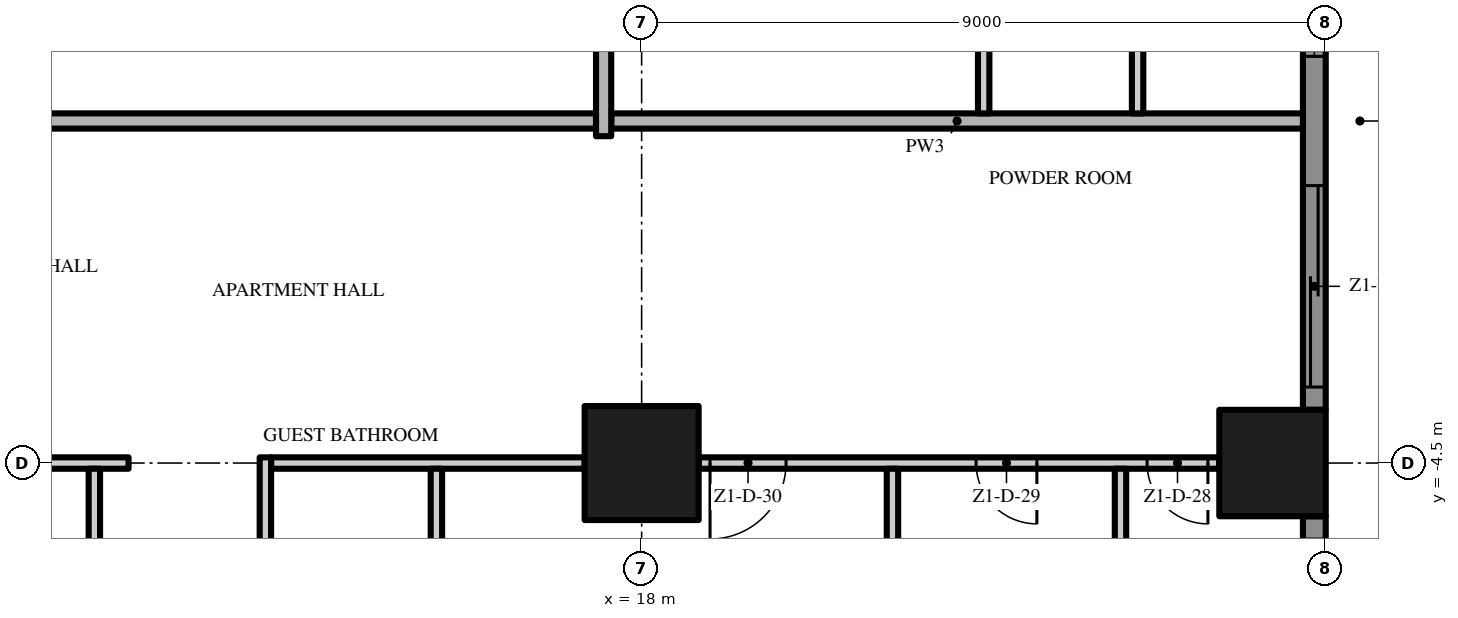
"""IFC4 building model, lengths in metres.
Left out: names, types, materials, properties, quantities, classifications, styles, units other than length and angle.
Written with IfcOpenShell. Run it as: python <this file> out.ifc"""

import sys

from ifc_helpers import new_model, si_unit, direction, frame, frame_2d, origin, origin_2d, place, context, subcontext, project, spatial, polyline, rectangle, outline, extrude, element, fill, save


model = new_model("IFC4")
c1 = context("Model", 3, precision=1e-05, world=origin(), true_north=direction((0.0, 1.0)))
c2 = subcontext(c1, "Body", "Model", "MODEL_VIEW")
j1 = project(units=[si_unit("LENGTHUNIT", "METRE"), si_unit("PLANEANGLEUNIT", "RADIAN")], contexts=[c1])
p1 = place(None, origin())
s1 = spatial("IfcSite", under=j1, at=p1, CompositionType="ELEMENT")
p2 = place(p1, origin())
s2 = spatial("IfcBuilding", under=s1, at=p2, CompositionType="ELEMENT")
p3 = place(p2, frame((0.0, 0.0, 49.2)))
s3 = spatial("IfcBuildingStorey", under=s2, at=p3, CompositionType="ELEMENT", Elevation=49.2)
p4 = place(p3, frame((18.0, -4.5, 0.0), z_axis=(0.0, 0.0, 1.0), x_axis=(1.0, 0.0, 0.0)))
e1 = element("IfcColumn", 1, at=p4, inside=s3, PredefinedType="COLUMN", context=c2, shape_type="SweptSolid", body=[
    extrude(rectangle(XDim=1.5, YDim=1.5, at=origin_2d()), origin(), (0.0, 0.0, 1.0), 3.5),
])
p5 = place(p3, frame((26.3, -4.5, 0.0), z_axis=(0.0, 0.0, 1.0), x_axis=(1.0, 0.0, 0.0)))
e2 = element("IfcColumn", 2, at=p5, inside=s3, PredefinedType="COLUMN", context=c2, shape_type="SweptSolid", body=[
    extrude(rectangle(XDim=1.4, YDim=1.4, at=origin_2d()), origin(), (0.0, 0.0, 1.0), 3.5),
])
p6 = place(p3, frame((26.85, -5.2, 0.0), z_axis=(0.0, 0.0, 1.0), x_axis=(0.0, -1.0, 0.0)))
e3 = element("IfcWall", 3, at=p6, inside=s3, PredefinedType="SOLIDWALL", context=c2, shape_type="SweptSolid", body=[
    extrude(rectangle(XDim=7.6, YDim=0.3, at=frame_2d((3.8, 0.0))), origin(), (0.0, 0.0, 1.0), 3.5),
])
p7 = place(p6, frame((4.65, 0.0, 0.45)))
e4 = element("IfcOpeningElement", 4, at=p7, cuts=e3, PredefinedType="OPENING", context=c2, shape_type="SweptSolid", body=[
    extrude(rectangle(XDim=2.65, YDim=2.65, at=frame_2d((1.325, 1.325))), frame((0.0, 0.16, 0.0), z_axis=(0.0, -1.0, 0.0), x_axis=(1.0, 0.0, 0.0)), (0.0, 0.0, 1.0), 0.32),
])
p8 = place(p6, frame((0.3, 0.0, 0.45)))
e5 = element("IfcOpeningElement", 5, at=p8, cuts=e3, PredefinedType="OPENING", context=c2, shape_type="SweptSolid", body=[
    extrude(rectangle(XDim=2.65, YDim=2.65, at=frame_2d((1.325, 1.325))), frame((0.0, 0.16, 0.0), z_axis=(0.0, -1.0, 0.0), x_axis=(1.0, 0.0, 0.0)), (0.0, 0.0, 1.0), 0.32),
])
p9 = place(p3, frame((26.85, 3.8, 0.0), z_axis=(0.0, 0.0, 1.0), x_axis=(0.0, -1.0, 0.0)))
e6 = element("IfcWall", 6, at=p9, inside=s3, PredefinedType="SOLIDWALL", context=c2, shape_type="SweptSolid", body=[
    extrude(rectangle(XDim=7.6, YDim=0.3, at=frame_2d((3.8, 0.0))), origin(), (0.0, 0.0, 1.0), 3.5),
])
p10 = place(p9, frame((4.65, 0.0, 0.0)))
e7 = element("IfcOpeningElement", 7, at=p10, cuts=e6, PredefinedType="OPENING", context=c2, shape_type="SweptSolid", body=[
    extrude(rectangle(XDim=2.65, YDim=2.4, at=frame_2d((1.325, 1.2))), frame((0.0, 0.16, 0.0), z_axis=(0.0, -1.0, 0.0), x_axis=(1.0, 0.0, 0.0)), (0.0, 0.0, 1.0), 0.32),
])
p11 = place(p9, frame((0.3, 0.0, 0.45)))
e8 = element("IfcOpeningElement", 8, at=p11, cuts=e6, PredefinedType="OPENING", context=c2, shape_type="SweptSolid", body=[
    extrude(rectangle(XDim=2.65, YDim=2.65, at=frame_2d((1.325, 1.325))), frame((0.0, 0.16, 0.0), z_axis=(0.0, -1.0, 0.0), x_axis=(1.0, 0.0, 0.0)), (0.0, 0.0, 1.0), 0.32),
])
p12 = place(p3, origin())
e9 = element("IfcWall", 9, at=p12, inside=s3, PredefinedType="USERDEFINED", context=c2, shape_type="SweptSolid", body=[
    extrude(outline(polyline([(29.649, -18.0), (29.985, -16.5), (30.0, -16.125), (29.869, -15.0), (29.345, -13.5), (28.612, -12.0), (27.951, -10.5), (27.615, -9.0), (27.6, -8.625), (27.731, -7.5), (28.255, -6.0), (28.988, -4.5), (29.649, -3.0), (29.985, -1.5), (30.0, -1.125), (29.869, 0.0), (29.345, 1.5), (28.612, 3.0), (27.951, 4.5), (27.615, 6.0), (27.6, 6.375), (27.731, 7.5), (28.255, 9.0), (28.988, 10.5), (29.649, 12.0), (29.985, 13.5), (30.0, 13.875), (29.869, 15.0), (29.345, 16.5), (28.612, 18.0), (28.388, 17.89), (29.114, 16.404), (29.624, 14.944), (29.749, 13.865), (29.736, 13.533), (29.41, 12.079), (28.761, 10.605), (28.024, 9.096), (27.486, 7.556), (27.349, 6.385), (27.366, 5.967), (27.713, 4.421), (28.385, 2.895), (29.114, 1.404), (29.624, -0.056), (29.749, -1.135), (29.736, -1.467), (29.41, -2.921), (28.761, -4.395), (28.024, -5.904), (27.486, -7.444), (27.349, -8.615), (27.366, -9.033), (27.713, -10.579), (28.385, -12.105), (29.114, -13.596), (29.624, -15.056), (29.749, -16.135), (29.736, -16.467), (29.405, -17.945), (29.649, -18.0)])), origin(), (0.0, 0.0, 1.0), 0.9),
])
p13 = place(p3, frame((9.75, -4.5, 0.0), z_axis=(0.0, 0.0, 1.0), x_axis=(1.0, 0.0, 0.0)))
e10 = element("IfcWall", 10, at=p13, inside=s3, PredefinedType="PARTITIONING", context=c2, shape_type="SweptSolid", body=[
    extrude(rectangle(XDim=1.5, YDim=0.15, at=frame_2d((0.75, 0.0))), origin(), (0.0, 0.0, 1.0), 3.5),
])
p14 = place(p3, frame((13.125, -4.5, 0.0), z_axis=(0.0, 0.0, 1.0), x_axis=(1.0, 0.0, 0.0)))
e11 = element("IfcWall", 11, at=p14, inside=s3, PredefinedType="PARTITIONING", context=c2, shape_type="SweptSolid", body=[
    extrude(rectangle(XDim=4.125, YDim=0.15, at=frame_2d((2.062, 0.0))), origin(), (0.0, 0.0, 1.0), 3.5),
])
p15 = place(p3, frame((25.6, -4.5, 0.0), z_axis=(0.0, 0.0, 1.0), x_axis=(-1.0, 0.0, 0.0)))
e12 = element("IfcWall", 12, at=p15, inside=s3, PredefinedType="PARTITIONING", context=c2, shape_type="SweptSolid", body=[
    extrude(rectangle(XDim=6.85, YDim=0.15, at=frame_2d((3.425, 0.0))), origin(), (0.0, 0.0, 1.0), 3.5),
])
p16 = place(p15, frame((0.15, 0.0, 0.0)))
e13 = element("IfcOpeningElement", 13, at=p16, cuts=e12, PredefinedType="OPENING", context=c2, shape_type="SweptSolid", body=[
    extrude(rectangle(XDim=0.8, YDim=2.0, at=frame_2d((0.4, 1.0))), frame((0.0, 0.085, 0.0), z_axis=(0.0, -1.0, 0.0), x_axis=(1.0, 0.0, 0.0)), (0.0, 0.0, 1.0), 0.17),
])
p17 = place(p15, frame((2.4, 0.0, 0.0)))
e14 = element("IfcOpeningElement", 14, at=p17, cuts=e12, PredefinedType="OPENING", context=c2, shape_type="SweptSolid", body=[
    extrude(rectangle(XDim=0.8, YDim=2.0, at=frame_2d((0.4, 1.0))), frame((0.0, 0.085, 0.0), z_axis=(0.0, -1.0, 0.0), x_axis=(1.0, 0.0, 0.0)), (0.0, 0.0, 1.0), 0.17),
])
p18 = place(p15, frame((5.7, 0.0, 0.0)))
e15 = element("IfcOpeningElement", 15, at=p18, cuts=e12, PredefinedType="OPENING", context=c2, shape_type="SweptSolid", body=[
    extrude(rectangle(XDim=1.0, YDim=2.4, at=frame_2d((0.5, 1.2))), frame((0.0, 0.085, 0.0), z_axis=(0.0, -1.0, 0.0), x_axis=(1.0, 0.0, 0.0)), (0.0, 0.0, 1.0), 0.17),
])
p19 = place(p3, frame((17.4, 0.0, 0.0), z_axis=(0.0, 0.0, 1.0), x_axis=(-1.0, 0.0, 0.0)))
e16 = element("IfcWall", 16, at=p19, inside=s3, PredefinedType="PARTITIONING", context=c2, shape_type="SweptSolid", body=[
    extrude(rectangle(XDim=17.3, YDim=0.2, at=frame_2d((8.65, 0.0))), origin(), (0.0, 0.0, 1.0), 3.5),
])
p20 = place(p19, frame((7.65, 0.0, 0.0)))
e17 = element("IfcOpeningElement", 17, at=p20, cuts=e16, PredefinedType="OPENING", context=c2, shape_type="SweptSolid", body=[
    extrude(rectangle(XDim=1.5, YDim=2.4, at=frame_2d((0.75, 1.2))), frame((0.0, 0.11, 0.0), z_axis=(0.0, -1.0, 0.0), x_axis=(1.0, 0.0, 0.0)), (0.0, 0.0, 1.0), 0.22),
])
p21 = place(p3, frame((17.6, 0.0, 0.0), z_axis=(0.0, 0.0, 1.0), x_axis=(1.0, 0.0, 0.0)))
e18 = element("IfcWall", 18, at=p21, inside=s3, PredefinedType="PARTITIONING", context=c2, shape_type="SweptSolid", body=[
    extrude(rectangle(XDim=9.1, YDim=0.2, at=frame_2d((4.55, 0.0))), origin(), (0.0, 0.0, 1.0), 3.5),
])
p22 = place(p3, frame((10.8, -9.075, 0.0), z_axis=(0.0, 0.0, 1.0), x_axis=(0.0, 1.0, 0.0)))
e19 = element("IfcWall", 19, at=p22, inside=s3, PredefinedType="PARTITIONING", context=c2, shape_type="SweptSolid", body=[
    extrude(rectangle(XDim=4.5, YDim=0.15, at=frame_2d((2.25, 0.0))), origin(), (0.0, 0.0, 1.0), 3.5),
])
p23 = place(p3, frame((13.05, -4.425, 0.0), z_axis=(0.0, 0.0, 1.0), x_axis=(0.0, -1.0, 0.0)))
e20 = element("IfcWall", 20, at=p23, inside=s3, PredefinedType="PARTITIONING", context=c2, shape_type="SweptSolid", body=[
    extrude(rectangle(XDim=4.65, YDim=0.15, at=frame_2d((2.325, 0.0))), origin(), (0.0, 0.0, 1.0), 3.5),
])
p24 = place(p23, frame((1.875, 0.0, 0.0)))
e21 = element("IfcOpeningElement", 21, at=p24, cuts=e20, PredefinedType="OPENING", context=c2, shape_type="SweptSolid", body=[
    extrude(rectangle(XDim=0.9, YDim=2.1, at=frame_2d((0.45, 1.05))), frame((0.0, 0.085, 0.0), z_axis=(0.0, -1.0, 0.0), x_axis=(1.0, 0.0, 0.0)), (0.0, 0.0, 1.0), 0.17),
])
p25 = place(p3, frame((15.3, -8.925, 0.0), z_axis=(0.0, 0.0, 1.0), x_axis=(0.0, 1.0, 0.0)))
e22 = element("IfcWall", 22, at=p25, inside=s3, PredefinedType="PARTITIONING", context=c2, shape_type="SweptSolid", body=[
    extrude(rectangle(XDim=4.35, YDim=0.15, at=frame_2d((2.175, 0.0))), origin(), (0.0, 0.0, 1.0), 3.5),
])
p26 = place(p3, frame((17.5, -0.2, 0.0), z_axis=(0.0, 0.0, 1.0), x_axis=(0.0, 1.0, 0.0)))
e23 = element("IfcWall", 23, at=p26, inside=s3, PredefinedType="PARTITIONING", context=c2, shape_type="SweptSolid", body=[
    extrude(rectangle(XDim=3.95, YDim=0.2, at=frame_2d((1.975, 0.0))), origin(), (0.0, 0.0, 1.0), 3.5),
])
p27 = place(p3, frame((21.3, -8.925, 0.0), z_axis=(0.0, 0.0, 1.0), x_axis=(0.0, 1.0, 0.0)))
e24 = element("IfcWall", 24, at=p27, inside=s3, PredefinedType="PARTITIONING", context=c2, shape_type="SweptSolid", body=[
    extrude(rectangle(XDim=4.35, YDim=0.15, at=frame_2d((2.175, 0.0))), origin(), (0.0, 0.0, 1.0), 3.5),
])
p28 = place(p3, frame((22.5, 17.3, 0.0), z_axis=(0.0, 0.0, 1.0), x_axis=(0.0, -1.0, 0.0)))
e25 = element("IfcWall", 25, at=p28, inside=s3, PredefinedType="PARTITIONING", context=c2, shape_type="SweptSolid", body=[
    extrude(rectangle(XDim=17.2, YDim=0.15, at=frame_2d((8.6, 0.0))), origin(), (0.0, 0.0, 1.0), 3.5),
])
p29 = place(p28, frame((13.0, 0.0, 0.0)))
e26 = element("IfcOpeningElement", 26, at=p29, cuts=e25, PredefinedType="OPENING", context=c2, shape_type="SweptSolid", body=[
    extrude(rectangle(XDim=1.8, YDim=2.4, at=frame_2d((0.9, 1.2))), frame((0.0, 0.085, 0.0), z_axis=(0.0, -1.0, 0.0), x_axis=(1.0, 0.0, 0.0)), (0.0, 0.0, 1.0), 0.17),
])
p30 = place(p28, frame((5.55, 0.0, 0.0)))
e27 = element("IfcOpeningElement", 27, at=p30, cuts=e25, PredefinedType="OPENING", context=c2, shape_type="SweptSolid", body=[
    extrude(rectangle(XDim=1.0, YDim=2.4, at=frame_2d((0.5, 1.2))), frame((0.0, 0.085, 0.0), z_axis=(0.0, -1.0, 0.0), x_axis=(1.0, 0.0, 0.0)), (0.0, 0.0, 1.0), 0.17),
])
p31 = place(p28, frame((0.15, 0.0, 0.0)))
e28 = element("IfcOpeningElement", 28, at=p31, cuts=e25, PredefinedType="OPENING", context=c2, shape_type="SweptSolid", body=[
    extrude(rectangle(XDim=1.0, YDim=2.4, at=frame_2d((0.5, 1.2))), frame((0.0, 0.085, 0.0), z_axis=(0.0, -1.0, 0.0), x_axis=(1.0, 0.0, 0.0)), (0.0, 0.0, 1.0), 0.17),
])
p32 = place(p3, frame((24.3, -8.925, 0.0), z_axis=(0.0, 0.0, 1.0), x_axis=(0.0, 1.0, 0.0)))
e29 = element("IfcWall", 29, at=p32, inside=s3, PredefinedType="PARTITIONING", context=c2, shape_type="SweptSolid", body=[
    extrude(rectangle(XDim=4.35, YDim=0.15, at=frame_2d((2.175, 0.0))), origin(), (0.0, 0.0, 1.0), 3.5),
])
p33 = place(p3, frame((24.525, 0.1, 0.0), z_axis=(0.0, 0.0, 1.0), x_axis=(0.0, 1.0, 0.0)))
e30 = element("IfcWall", 30, at=p33, inside=s3, PredefinedType="PARTITIONING", context=c2, shape_type="SweptSolid", body=[
    extrude(rectangle(XDim=2.225, YDim=0.15, at=frame_2d((1.113, 0.0))), origin(), (0.0, 0.0, 1.0), 3.5),
])
p34 = place(p10, origin())
e31 = element("IfcDoor", 31, at=p34, inside=s3, OperationType="SINGLE_SWING_LEFT", PredefinedType="DOOR", context=c2, shape_type="SweptSolid", body=[
    extrude(rectangle(XDim=2.65, YDim=2.4, at=frame_2d((1.325, 1.2))), frame((0.0, 0.025, 0.0), z_axis=(0.0, -1.0, 0.0), x_axis=(1.0, 0.0, 0.0)), (0.0, 0.0, 1.0), 0.05),
])
fill(e7, e31)
p35 = place(p11, origin())
e32 = element("IfcWindow", 32, at=p35, inside=s3, PartitioningType="SINGLE_PANEL", PredefinedType="WINDOW", context=c2, shape_type="SweptSolid", body=[
    extrude(rectangle(XDim=2.65, YDim=2.65, at=frame_2d((1.325, 1.325))), frame((0.0, 0.03, 0.0), z_axis=(0.0, -1.0, 0.0), x_axis=(1.0, 0.0, 0.0)), (0.0, 0.0, 1.0), 0.06),
])
fill(e8, e32)
p36 = place(p16, origin())
e33 = element("IfcDoor", 33, at=p36, inside=s3, OperationType="SINGLE_SWING_LEFT", PredefinedType="DOOR", context=c2, shape_type="SweptSolid", body=[
    extrude(rectangle(XDim=0.8, YDim=2.0, at=frame_2d((0.4, 1.0))), frame((0.0, 0.025, 0.0), z_axis=(0.0, -1.0, 0.0), x_axis=(1.0, 0.0, 0.0)), (0.0, 0.0, 1.0), 0.05),
])
fill(e13, e33)
p37 = place(p17, origin())
e34 = element("IfcDoor", 34, at=p37, inside=s3, OperationType="SINGLE_SWING_LEFT", PredefinedType="DOOR", context=c2, shape_type="SweptSolid", body=[
    extrude(rectangle(XDim=0.8, YDim=2.0, at=frame_2d((0.4, 1.0))), frame((0.0, 0.025, 0.0), z_axis=(0.0, -1.0, 0.0), x_axis=(1.0, 0.0, 0.0)), (0.0, 0.0, 1.0), 0.05),
])
fill(e14, e34)
p38 = place(p18, origin())
e35 = element("IfcDoor", 35, at=p38, inside=s3, OperationType="SINGLE_SWING_RIGHT", PredefinedType="DOOR", context=c2, shape_type="SweptSolid", body=[
    extrude(rectangle(XDim=1.0, YDim=2.4, at=frame_2d((0.5, 1.2))), frame((0.0, 0.025, 0.0), z_axis=(0.0, -1.0, 0.0), x_axis=(1.0, 0.0, 0.0)), (0.0, 0.0, 1.0), 0.05),
])
fill(e15, e35)
save(model, sys.argv[1])
